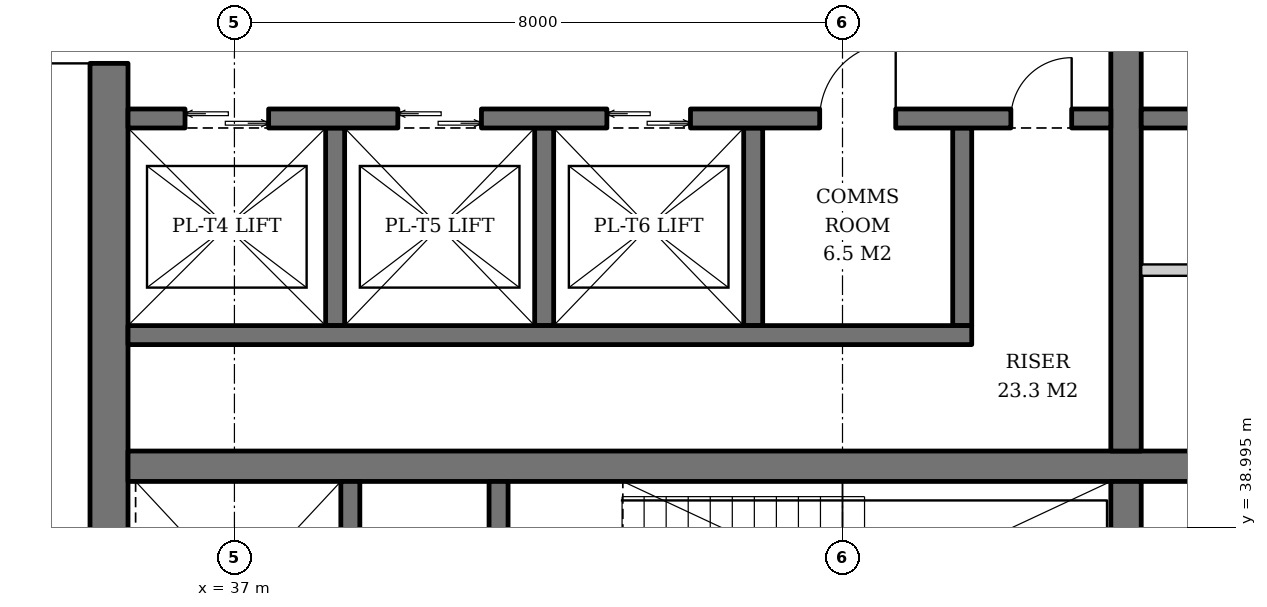
"""IFC4 building model, lengths in metres.
Left out: names, types, materials, properties, quantities, classifications, styles, units other than length and angle.
Written with IfcOpenShell. Run it as: python <this file> out.ifc"""

import sys

from ifc_helpers import new_model, si_unit, direction, frame, frame_2d, origin, place, context, subcontext, project, spatial, rectangle, extrude, element, fill, save


model = new_model("IFC4")
c1 = context("Model", 3, precision=1e-05, world=origin(), true_north=direction((0.0, 1.0)))
c2 = subcontext(c1, "Body", "Model", "MODEL_VIEW")
j1 = project(units=[si_unit("LENGTHUNIT", "METRE"), si_unit("PLANEANGLEUNIT", "RADIAN")], contexts=[c1])
p1 = place(None, origin())
s1 = spatial("IfcSite", under=j1, at=p1, CompositionType="ELEMENT")
p2 = place(p1, origin())
s2 = spatial("IfcBuilding", under=s1, at=p2, CompositionType="ELEMENT")
p3 = place(p2, frame((0.0, 0.0, 279.4)))
s3 = spatial("IfcBuildingStorey", under=s2, at=p3, CompositionType="ELEMENT", Elevation=279.4)
p4 = place(p3, frame((35.35, 36.6, 0.0), z_axis=(0.0, 0.0, 1.0), x_axis=(0.0, 1.0, 0.0)))
e1 = element("IfcWall", 1, at=p4, inside=s3, PredefinedType="SHEAR", context=c2, shape_type="SweptSolid", body=[
    extrude(rectangle(XDim=18.8, YDim=0.5, at=frame_2d((9.4, 0.0))), origin(), (0.0, 0.0, 1.0), 3.8),
])
p5 = place(p4, frame((8.5, 0.0, 0.0)))
e2 = element("IfcOpeningElement", 2, at=p5, cuts=e1, PredefinedType="OPENING", context=c2, shape_type="SweptSolid", body=[
    extrude(rectangle(XDim=1.8, YDim=2.4, at=frame_2d((0.9, 1.2))), frame((0.0, 0.26, 0.0), z_axis=(0.0, -1.0, 0.0), x_axis=(1.0, 0.0, 0.0)), (0.0, 0.0, 1.0), 0.52),
])
p6 = place(p3, frame((35.6, 39.8, 0.0), z_axis=(0.0, 0.0, 1.0), x_axis=(1.0, 0.0, 0.0)))
e3 = element("IfcWall", 3, at=p6, inside=s3, PredefinedType="SHEAR", context=c2, shape_type="SweptSolid", body=[
    extrude(rectangle(XDim=18.8, YDim=0.4, at=frame_2d((9.4, 0.0))), origin(), (0.0, 0.0, 1.0), 3.8),
])
p7 = place(p3, frame((48.73, 36.6, 0.0), z_axis=(0.0, 0.0, 1.0), x_axis=(0.0, 1.0, 0.0)))
e4 = element("IfcWall", 4, at=p7, inside=s3, PredefinedType="SHEAR", context=c2, shape_type="SweptSolid", body=[
    extrude(rectangle(XDim=3.0, YDim=0.4, at=frame_2d((1.5, 0.0))), origin(), (0.0, 0.0, 1.0), 3.8),
])
p8 = place(p3, frame((48.73, 40.0, 0.0), z_axis=(0.0, 0.0, 1.0), x_axis=(0.0, 1.0, 0.0)))
e5 = element("IfcWall", 5, at=p8, inside=s3, PredefinedType="SHEAR", context=c2, shape_type="SweptSolid", body=[
    extrude(rectangle(XDim=12.0, YDim=0.4, at=frame_2d((6.0, 0.0))), origin(), (0.0, 0.0, 1.0), 3.8),
])
p9 = place(p3, frame((38.525, 36.6, 0.0), z_axis=(0.0, 0.0, 1.0), x_axis=(0.0, 1.0, 0.0)))
e6 = element("IfcWall", 6, at=p9, inside=s3, PredefinedType="SHEAR", context=c2, shape_type="SweptSolid", body=[
    extrude(rectangle(XDim=3.0, YDim=0.25, at=frame_2d((1.5, 0.0))), origin(), (0.0, 0.0, 1.0), 3.8),
])
p10 = place(p9, frame((0.9, 0.0, 0.0)))
e7 = element("IfcOpeningElement", 7, at=p10, cuts=e6, PredefinedType="OPENING", context=c2, shape_type="SweptSolid", body=[
    extrude(rectangle(XDim=1.3, YDim=2.2, at=frame_2d((0.65, 1.1))), frame((0.0, 0.135, 0.0), z_axis=(0.0, -1.0, 0.0), x_axis=(1.0, 0.0, 0.0)), (0.0, 0.0, 1.0), 0.27),
])
p11 = place(p3, frame((40.475, 36.6, 0.0), z_axis=(0.0, 0.0, 1.0), x_axis=(0.0, 1.0, 0.0)))
e8 = element("IfcWall", 8, at=p11, inside=s3, PredefinedType="SHEAR", context=c2, shape_type="SweptSolid", body=[
    extrude(rectangle(XDim=3.0, YDim=0.25, at=frame_2d((1.5, 0.0))), origin(), (0.0, 0.0, 1.0), 3.8),
])
p12 = place(p11, frame((0.85, 0.0, 0.0)))
e9 = element("IfcOpeningElement", 9, at=p12, cuts=e8, PredefinedType="OPENING", context=c2, shape_type="SweptSolid", body=[
    extrude(rectangle(XDim=1.2, YDim=2.1, at=frame_2d((0.6, 1.05))), frame((0.0, 0.135, 0.0), z_axis=(0.0, -1.0, 0.0), x_axis=(1.0, 0.0, 0.0)), (0.0, 0.0, 1.0), 0.27),
])
for number, where, z_axis, x_axis in (
    (10, (38.325, 44.25, 0.0), (0.0, 0.0, 1.0), (0.0, -1.0, 0.0)),
    (11, (41.075, 44.25, 0.0), (0.0, 0.0, 1.0), (0.0, -1.0, 0.0)),
    (12, (43.825, 44.25, 0.0), (0.0, 0.0, 1.0), (0.0, -1.0, 0.0)),
    (13, (46.575, 44.25, 0.0), (0.0, 0.0, 1.0), (0.0, -1.0, 0.0)),
):
    element("IfcWall", number, at=place(p3, frame(where, z_axis=z_axis, x_axis=x_axis)), inside=s3, PredefinedType="SHEAR", context=c2, shape_type="SweptSolid", body=[
        extrude(rectangle(XDim=2.6, YDim=0.25, at=frame_2d((1.3, 0.0))), origin(), (0.0, 0.0, 1.0), 3.8),
    ])
p13 = place(p3, frame((35.6, 41.525, 0.0), z_axis=(0.0, 0.0, 1.0), x_axis=(1.0, 0.0, 0.0)))
e14 = element("IfcWall", 14, at=p13, inside=s3, PredefinedType="SHEAR", context=c2, shape_type="SweptSolid", body=[
    extrude(rectangle(XDim=11.1, YDim=0.25, at=frame_2d((5.55, 0.0))), origin(), (0.0, 0.0, 1.0), 3.8),
])
p14 = place(p3, frame((35.6, 44.375, 0.0), z_axis=(0.0, 0.0, 1.0), x_axis=(1.0, 0.0, 0.0)))
e15 = element("IfcWall", 15, at=p14, inside=s3, PredefinedType="SHEAR", context=c2, shape_type="SweptSolid", body=[
    extrude(rectangle(XDim=12.93, YDim=0.25, at=frame_2d((6.465, 0.0))), origin(), (0.0, 0.0, 1.0), 3.8),
])
p15 = place(p14, frame((0.75, 0.0, 0.0)))
e16 = element("IfcOpeningElement", 16, at=p15, cuts=e15, PredefinedType="OPENING", context=c2, shape_type="SweptSolid", body=[
    extrude(rectangle(XDim=1.1, YDim=2.2, at=frame_2d((0.55, 1.1))), frame((0.0, 0.135, 0.0), z_axis=(0.0, -1.0, 0.0), x_axis=(1.0, 0.0, 0.0)), (0.0, 0.0, 1.0), 0.27),
])
p16 = place(p14, frame((3.55, 0.0, 0.0)))
e17 = element("IfcOpeningElement", 17, at=p16, cuts=e15, PredefinedType="OPENING", context=c2, shape_type="SweptSolid", body=[
    extrude(rectangle(XDim=1.1, YDim=2.2, at=frame_2d((0.55, 1.1))), frame((0.0, 0.135, 0.0), z_axis=(0.0, -1.0, 0.0), x_axis=(1.0, 0.0, 0.0)), (0.0, 0.0, 1.0), 0.27),
])
p17 = place(p14, frame((6.3, 0.0, 0.0)))
e18 = element("IfcOpeningElement", 18, at=p17, cuts=e15, PredefinedType="OPENING", context=c2, shape_type="SweptSolid", body=[
    extrude(rectangle(XDim=1.1, YDim=2.2, at=frame_2d((0.55, 1.1))), frame((0.0, 0.135, 0.0), z_axis=(0.0, -1.0, 0.0), x_axis=(1.0, 0.0, 0.0)), (0.0, 0.0, 1.0), 0.27),
])
p18 = place(p14, frame((9.1, 0.0, 0.0)))
e19 = element("IfcOpeningElement", 19, at=p18, cuts=e15, PredefinedType="OPENING", context=c2, shape_type="SweptSolid", body=[
    extrude(rectangle(XDim=1.0, YDim=2.1, at=frame_2d((0.5, 1.05))), frame((0.0, 0.135, 0.0), z_axis=(0.0, -1.0, 0.0), x_axis=(1.0, 0.0, 0.0)), (0.0, 0.0, 1.0), 0.27),
])
p19 = place(p14, frame((11.615, 0.0, 0.0)))
e20 = element("IfcOpeningElement", 20, at=p19, cuts=e15, PredefinedType="OPENING", context=c2, shape_type="SweptSolid", body=[
    extrude(rectangle(XDim=0.8, YDim=2.0, at=frame_2d((0.4, 1.0))), frame((0.0, 0.135, 0.0), z_axis=(0.0, -1.0, 0.0), x_axis=(1.0, 0.0, 0.0)), (0.0, 0.0, 1.0), 0.27),
])
p20 = place(p3, frame((48.93, 44.375, 0.0), z_axis=(0.0, 0.0, 1.0), x_axis=(1.0, 0.0, 0.0)))
e21 = element("IfcWall", 21, at=p20, inside=s3, PredefinedType="SHEAR", context=c2, shape_type="SweptSolid", body=[
    extrude(rectangle(XDim=5.47, YDim=0.25, at=frame_2d((2.735, 0.0))), origin(), (0.0, 0.0, 1.0), 3.8),
])
p21 = place(p20, frame((0.78, 0.0, 0.0)))
e22 = element("IfcOpeningElement", 22, at=p21, cuts=e21, PredefinedType="OPENING", context=c2, shape_type="SweptSolid", body=[
    extrude(rectangle(XDim=1.0, YDim=2.1, at=frame_2d((0.5, 1.05))), frame((0.0, 0.135, 0.0), z_axis=(0.0, -1.0, 0.0), x_axis=(1.0, 0.0, 0.0)), (0.0, 0.0, 1.0), 0.27),
])
p22 = place(p20, frame((3.64, 0.0, 0.0)))
e23 = element("IfcOpeningElement", 23, at=p22, cuts=e21, PredefinedType="OPENING", context=c2, shape_type="SweptSolid", body=[
    extrude(rectangle(XDim=1.0, YDim=2.1, at=frame_2d((0.5, 1.05))), frame((0.0, 0.135, 0.0), z_axis=(0.0, -1.0, 0.0), x_axis=(1.0, 0.0, 0.0)), (0.0, 0.0, 1.0), 0.27),
])
p23 = place(p3, frame((48.93, 42.38, 0.0), z_axis=(0.0, 0.0, 1.0), x_axis=(1.0, 0.0, 0.0)))
e24 = element("IfcWall", 24, at=p23, inside=s3, PredefinedType="SOLIDWALL", context=c2, shape_type="SweptSolid", body=[
    extrude(rectangle(XDim=2.56, YDim=0.15, at=frame_2d((1.28, 0.0))), origin(), (0.0, 0.0, 1.0), 3.5),
])
p24 = place(p23, frame((0.78, 0.0, 0.0)))
e25 = element("IfcOpeningElement", 25, at=p24, cuts=e24, PredefinedType="OPENING", context=c2, shape_type="SweptSolid", body=[
    extrude(rectangle(XDim=1.0, YDim=2.1, at=frame_2d((0.5, 1.05))), frame((0.0, 0.085, 0.0), z_axis=(0.0, -1.0, 0.0), x_axis=(1.0, 0.0, 0.0)), (0.0, 0.0, 1.0), 0.17),
])
p25 = place(p15, origin())
e26 = element("IfcDoor", 26, at=p25, inside=s3, OperationType="DOUBLE_DOOR_SLIDING", PredefinedType="DOOR", context=c2, shape_type="SweptSolid", body=[
    extrude(rectangle(XDim=1.1, YDim=2.2, at=frame_2d((0.55, 1.1))), frame((0.0, 0.025, 0.0), z_axis=(0.0, -1.0, 0.0), x_axis=(1.0, 0.0, 0.0)), (0.0, 0.0, 1.0), 0.05),
])
fill(e16, e26)
p26 = place(p16, origin())
e27 = element("IfcDoor", 27, at=p26, inside=s3, OperationType="DOUBLE_DOOR_SLIDING", PredefinedType="DOOR", context=c2, shape_type="SweptSolid", body=[
    extrude(rectangle(XDim=1.1, YDim=2.2, at=frame_2d((0.55, 1.1))), frame((0.0, 0.025, 0.0), z_axis=(0.0, -1.0, 0.0), x_axis=(1.0, 0.0, 0.0)), (0.0, 0.0, 1.0), 0.05),
])
fill(e17, e27)
p27 = place(p17, origin())
e28 = element("IfcDoor", 28, at=p27, inside=s3, OperationType="DOUBLE_DOOR_SLIDING", PredefinedType="DOOR", context=c2, shape_type="SweptSolid", body=[
    extrude(rectangle(XDim=1.1, YDim=2.2, at=frame_2d((0.55, 1.1))), frame((0.0, 0.025, 0.0), z_axis=(0.0, -1.0, 0.0), x_axis=(1.0, 0.0, 0.0)), (0.0, 0.0, 1.0), 0.05),
])
fill(e18, e28)
p28 = place(p18, origin())
e29 = element("IfcDoor", 29, at=p28, inside=s3, OperationType="SINGLE_SWING_RIGHT", PredefinedType="DOOR", context=c2, shape_type="SweptSolid", body=[
    extrude(rectangle(XDim=1.0, YDim=2.1, at=frame_2d((0.5, 1.05))), frame((0.0, 0.025, 0.0), z_axis=(0.0, -1.0, 0.0), x_axis=(1.0, 0.0, 0.0)), (0.0, 0.0, 1.0), 0.05),
])
fill(e19, e29)
p29 = place(p19, origin())
e30 = element("IfcDoor", 30, at=p29, inside=s3, OperationType="SINGLE_SWING_RIGHT", PredefinedType="DOOR", context=c2, shape_type="SweptSolid", body=[
    extrude(rectangle(XDim=0.8, YDim=2.0, at=frame_2d((0.4, 1.0))), frame((0.0, 0.025, 0.0), z_axis=(0.0, -1.0, 0.0), x_axis=(1.0, 0.0, 0.0)), (0.0, 0.0, 1.0), 0.05),
])
fill(e20, e30)
p30 = place(p5, origin())
e31 = element("IfcDoor", 31, at=p30, inside=s3, OperationType="DOUBLE_DOOR_SINGLE_SWING", PredefinedType="DOOR", context=c2, shape_type="SweptSolid", body=[
    extrude(rectangle(XDim=1.8, YDim=2.4, at=frame_2d((0.9, 1.2))), frame((0.0, 0.025, 0.0), z_axis=(0.0, -1.0, 0.0), x_axis=(1.0, 0.0, 0.0)), (0.0, 0.0, 1.0), 0.05),
])
fill(e2, e31)
save(model, sys.argv[1])
